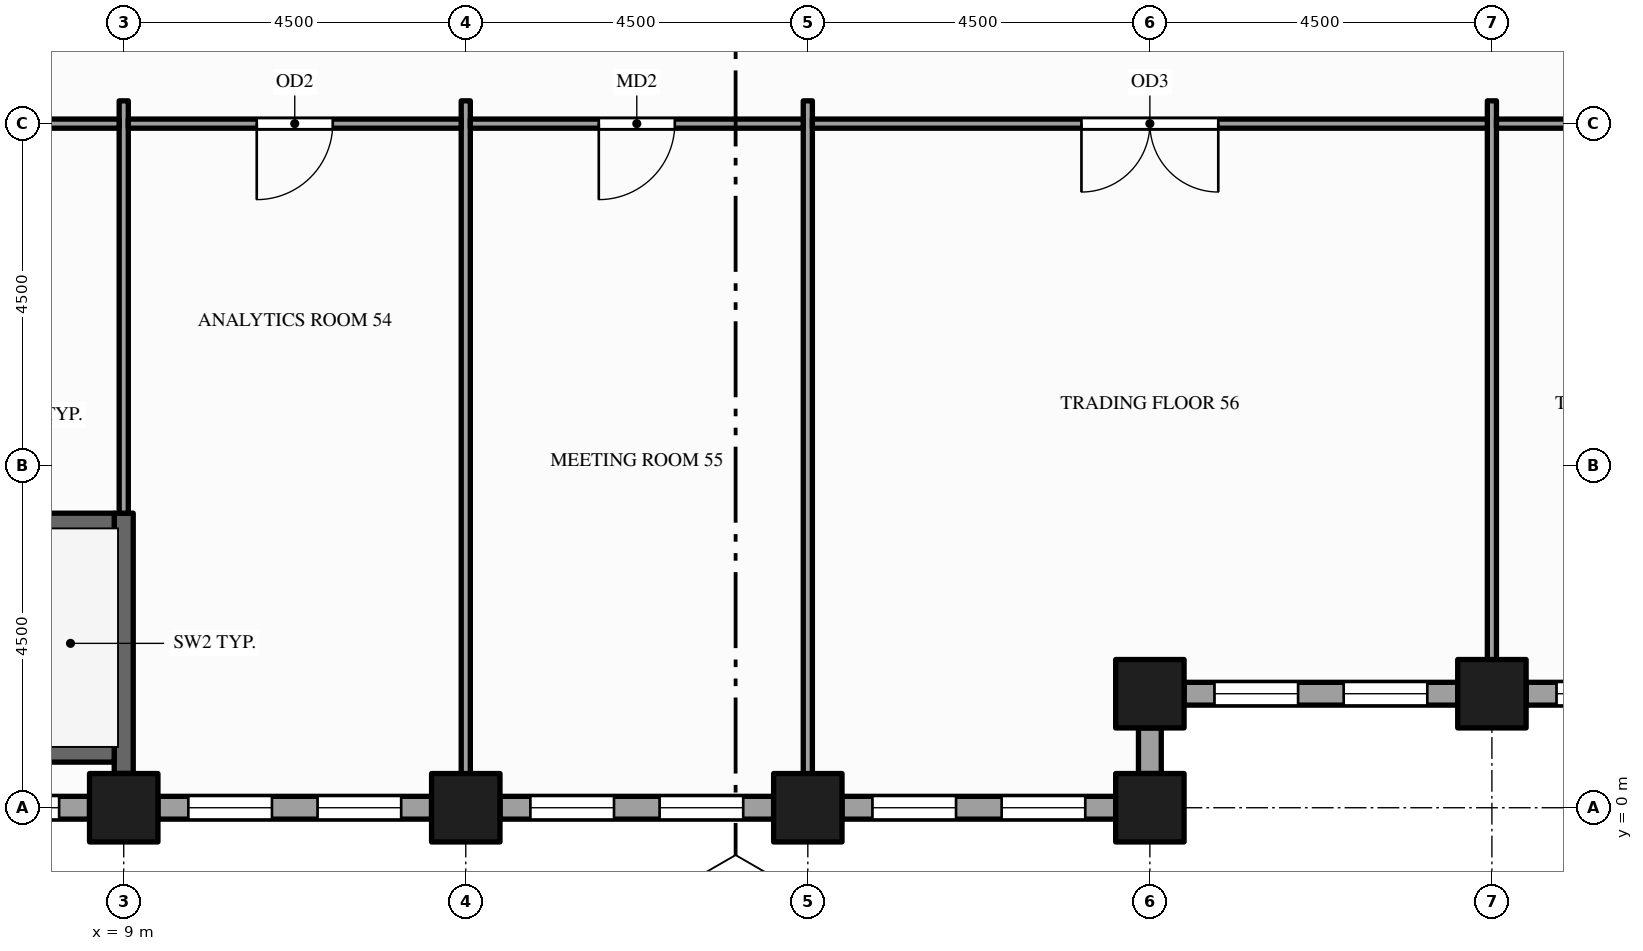
"""IFC4 building model, lengths in metres.
Left out: names, types, materials, properties, quantities, classifications, styles, units other than length and angle.
Written with IfcOpenShell. Run it as: python <this file> out.ifc"""

import sys

from ifc_helpers import new_model, si_unit, direction, frame, frame_2d, origin, origin_2d, place, context, subcontext, project, spatial, rectangle, hollow_rectangle, extrude, element, fill, save


model = new_model("IFC4")
c1 = context("Model", 3, precision=1e-05, world=origin(), true_north=direction((0.0, 1.0)))
c2 = subcontext(c1, "Body", "Model", "MODEL_VIEW")
j1 = project(units=[si_unit("LENGTHUNIT", "METRE"), si_unit("PLANEANGLEUNIT", "RADIAN")], contexts=[c1])
p1 = place(None, origin())
s1 = spatial("IfcSite", under=j1, at=p1, CompositionType="ELEMENT")
p2 = place(p1, origin())
s2 = spatial("IfcBuilding", under=s1, at=p2, CompositionType="ELEMENT")
p3 = place(p2, frame((0.0, 0.0, 139.0)))
s3 = spatial("IfcBuildingStorey", under=s2, at=p3, CompositionType="ELEMENT", Elevation=139.0)
for number, where, z_axis, x_axis in (
    (1, (9.0, 0.0, -0.15), (0.0, 0.0, 1.0), (1.0, 0.0, 0.0)),
    (2, (13.5, 0.0, -0.15), (0.0, 0.0, 1.0), (1.0, 0.0, 0.0)),
    (3, (18.0, 0.0, -0.15), (0.0, 0.0, 1.0), (1.0, 0.0, 0.0)),
    (4, (22.5, 0.0, -0.15), (0.0, 0.0, 1.0), (1.0, 0.0, 0.0)),
    (5, (22.5, 1.5, -0.15), (0.0, 0.0, 1.0), (1.0, 0.0, 0.0)),
    (6, (27.0, 1.5, -0.15), (0.0, 0.0, 1.0), (1.0, 0.0, 0.0)),
):
    element("IfcColumn", number, at=place(p3, frame(where, z_axis=z_axis, x_axis=x_axis)), inside=s3, PredefinedType="COLUMN", context=c2, shape_type="SweptSolid", body=[
        extrude(hollow_rectangle(XDim=0.9, YDim=0.9, WallThickness=0.045, at=origin_2d()), origin(), (0.0, 0.0, 1.0), 4.0),
    ])
p4 = place(p3, frame((4.95, 0.0, 0.0), z_axis=(0.0, 0.0, 1.0), x_axis=(1.0, 0.0, 0.0)))
e7 = element("IfcWall", 7, at=p4, inside=s3, PredefinedType="STANDARD", context=c2, shape_type="SweptSolid", body=[
    extrude(rectangle(XDim=3.6, YDim=0.3, at=frame_2d((1.8, 0.0))), origin(), (0.0, 0.0, 1.0), 3.149),
])
p5 = place(p4, frame((0.4, 0.0, 0.9)))
e8 = element("IfcOpeningElement", 8, at=p5, cuts=e7, PredefinedType="OPENING", context=c2, shape_type="SweptSolid", body=[
    extrude(rectangle(XDim=1.1, YDim=2.0, at=frame_2d((0.55, 1.0))), frame((0.0, 0.16, 0.0), z_axis=(0.0, -1.0, 0.0), x_axis=(1.0, 0.0, 0.0)), (0.0, 0.0, 1.0), 0.32),
])
p6 = place(p4, frame((2.1, 0.0, 0.9)))
e9 = element("IfcOpeningElement", 9, at=p6, cuts=e7, PredefinedType="OPENING", context=c2, shape_type="SweptSolid", body=[
    extrude(rectangle(XDim=1.1, YDim=2.0, at=frame_2d((0.55, 1.0))), frame((0.0, 0.16, 0.0), z_axis=(0.0, -1.0, 0.0), x_axis=(1.0, 0.0, 0.0)), (0.0, 0.0, 1.0), 0.32),
])
p7 = place(p3, frame((9.45, 0.0, 0.0), z_axis=(0.0, 0.0, 1.0), x_axis=(1.0, 0.0, 0.0)))
e10 = element("IfcWall", 10, at=p7, inside=s3, PredefinedType="STANDARD", context=c2, shape_type="SweptSolid", body=[
    extrude(rectangle(XDim=3.6, YDim=0.3, at=frame_2d((1.8, 0.0))), origin(), (0.0, 0.0, 1.0), 2.87),
])
p8 = place(p7, frame((0.4, 0.0, 0.9)))
e11 = element("IfcOpeningElement", 11, at=p8, cuts=e10, PredefinedType="OPENING", context=c2, shape_type="SweptSolid", body=[
    extrude(rectangle(XDim=1.1, YDim=1.75, at=frame_2d((0.55, 0.875))), frame((0.0, 0.16, 0.0), z_axis=(0.0, -1.0, 0.0), x_axis=(1.0, 0.0, 0.0)), (0.0, 0.0, 1.0), 0.32),
])
p9 = place(p7, frame((2.1, 0.0, 0.9)))
e12 = element("IfcOpeningElement", 12, at=p9, cuts=e10, PredefinedType="OPENING", context=c2, shape_type="SweptSolid", body=[
    extrude(rectangle(XDim=1.1, YDim=1.75, at=frame_2d((0.55, 0.875))), frame((0.0, 0.16, 0.0), z_axis=(0.0, -1.0, 0.0), x_axis=(1.0, 0.0, 0.0)), (0.0, 0.0, 1.0), 0.32),
])
p10 = place(p3, frame((13.95, 0.0, 0.0), z_axis=(0.0, 0.0, 1.0), x_axis=(1.0, 0.0, 0.0)))
e13 = element("IfcWall", 13, at=p10, inside=s3, PredefinedType="STANDARD", context=c2, shape_type="SweptSolid", body=[
    extrude(rectangle(XDim=3.6, YDim=0.3, at=frame_2d((1.8, 0.0))), origin(), (0.0, 0.0, 1.0), 2.87),
])
p11 = place(p10, frame((0.4, 0.0, 0.9)))
e14 = element("IfcOpeningElement", 14, at=p11, cuts=e13, PredefinedType="OPENING", context=c2, shape_type="SweptSolid", body=[
    extrude(rectangle(XDim=1.1, YDim=1.75, at=frame_2d((0.55, 0.875))), frame((0.0, 0.16, 0.0), z_axis=(0.0, -1.0, 0.0), x_axis=(1.0, 0.0, 0.0)), (0.0, 0.0, 1.0), 0.32),
])
p12 = place(p10, frame((2.1, 0.0, 0.9)))
e15 = element("IfcOpeningElement", 15, at=p12, cuts=e13, PredefinedType="OPENING", context=c2, shape_type="SweptSolid", body=[
    extrude(rectangle(XDim=1.1, YDim=1.75, at=frame_2d((0.55, 0.875))), frame((0.0, 0.16, 0.0), z_axis=(0.0, -1.0, 0.0), x_axis=(1.0, 0.0, 0.0)), (0.0, 0.0, 1.0), 0.32),
])
p13 = place(p3, frame((18.45, 0.0, 0.0), z_axis=(0.0, 0.0, 1.0), x_axis=(1.0, 0.0, 0.0)))
e16 = element("IfcWall", 16, at=p13, inside=s3, PredefinedType="STANDARD", context=c2, shape_type="SweptSolid", body=[
    extrude(rectangle(XDim=3.6, YDim=0.3, at=frame_2d((1.8, 0.0))), origin(), (0.0, 0.0, 1.0), 2.87),
])
p14 = place(p13, frame((0.4, 0.0, 0.9)))
e17 = element("IfcOpeningElement", 17, at=p14, cuts=e16, PredefinedType="OPENING", context=c2, shape_type="SweptSolid", body=[
    extrude(rectangle(XDim=1.1, YDim=1.75, at=frame_2d((0.55, 0.875))), frame((0.0, 0.16, 0.0), z_axis=(0.0, -1.0, 0.0), x_axis=(1.0, 0.0, 0.0)), (0.0, 0.0, 1.0), 0.32),
])
p15 = place(p13, frame((2.1, 0.0, 0.9)))
e18 = element("IfcOpeningElement", 18, at=p15, cuts=e16, PredefinedType="OPENING", context=c2, shape_type="SweptSolid", body=[
    extrude(rectangle(XDim=1.1, YDim=1.75, at=frame_2d((0.55, 0.875))), frame((0.0, 0.16, 0.0), z_axis=(0.0, -1.0, 0.0), x_axis=(1.0, 0.0, 0.0)), (0.0, 0.0, 1.0), 0.32),
])
p16 = place(p3, frame((22.5, 0.45, 0.0), z_axis=(0.0, 0.0, 1.0), x_axis=(0.0, 1.0, 0.0)))
e19 = element("IfcWall", 19, at=p16, inside=s3, PredefinedType="STANDARD", context=c2, shape_type="SweptSolid", body=[
    extrude(rectangle(XDim=0.6, YDim=0.3, at=frame_2d((0.3, 0.0))), origin(), (0.0, 0.0, 1.0), 3.149),
])
p17 = place(p3, frame((22.95, 1.5, 0.0), z_axis=(0.0, 0.0, 1.0), x_axis=(1.0, 0.0, 0.0)))
e20 = element("IfcWall", 20, at=p17, inside=s3, PredefinedType="STANDARD", context=c2, shape_type="SweptSolid", body=[
    extrude(rectangle(XDim=3.6, YDim=0.3, at=frame_2d((1.8, 0.0))), origin(), (0.0, 0.0, 1.0), 2.87),
])
p18 = place(p17, frame((0.4, 0.0, 0.9)))
e21 = element("IfcOpeningElement", 21, at=p18, cuts=e20, PredefinedType="OPENING", context=c2, shape_type="SweptSolid", body=[
    extrude(rectangle(XDim=1.1, YDim=1.75, at=frame_2d((0.55, 0.875))), frame((0.0, 0.16, 0.0), z_axis=(0.0, -1.0, 0.0), x_axis=(1.0, 0.0, 0.0)), (0.0, 0.0, 1.0), 0.32),
])
p19 = place(p17, frame((2.1, 0.0, 0.9)))
e22 = element("IfcOpeningElement", 22, at=p19, cuts=e20, PredefinedType="OPENING", context=c2, shape_type="SweptSolid", body=[
    extrude(rectangle(XDim=1.1, YDim=1.75, at=frame_2d((0.55, 0.875))), frame((0.0, 0.16, 0.0), z_axis=(0.0, -1.0, 0.0), x_axis=(1.0, 0.0, 0.0)), (0.0, 0.0, 1.0), 0.32),
])
p20 = place(p3, frame((27.45, 1.5, 0.0), z_axis=(0.0, 0.0, 1.0), x_axis=(1.0, 0.0, 0.0)))
e23 = element("IfcWall", 23, at=p20, inside=s3, PredefinedType="STANDARD", context=c2, shape_type="SweptSolid", body=[
    extrude(rectangle(XDim=3.6, YDim=0.3, at=frame_2d((1.8, 0.0))), origin(), (0.0, 0.0, 1.0), 2.87),
])
p21 = place(p20, frame((0.4, 0.0, 0.9)))
e24 = element("IfcOpeningElement", 24, at=p21, cuts=e23, PredefinedType="OPENING", context=c2, shape_type="SweptSolid", body=[
    extrude(rectangle(XDim=1.1, YDim=1.75, at=frame_2d((0.55, 0.875))), frame((0.0, 0.16, 0.0), z_axis=(0.0, -1.0, 0.0), x_axis=(1.0, 0.0, 0.0)), (0.0, 0.0, 1.0), 0.32),
])
p22 = place(p20, frame((2.1, 0.0, 0.9)))
e25 = element("IfcOpeningElement", 25, at=p22, cuts=e23, PredefinedType="OPENING", context=c2, shape_type="SweptSolid", body=[
    extrude(rectangle(XDim=1.1, YDim=1.75, at=frame_2d((0.55, 0.875))), frame((0.0, 0.16, 0.0), z_axis=(0.0, -1.0, 0.0), x_axis=(1.0, 0.0, 0.0)), (0.0, 0.0, 1.0), 0.32),
])
p23 = place(p3, frame((9.0, 0.15, 0.0), z_axis=(0.0, 0.0, 1.0), x_axis=(0.0, 1.0, 0.0)))
e26 = element("IfcWall", 26, at=p23, inside=s3, PredefinedType="PARTITIONING", context=c2, shape_type="SweptSolid", body=[
    extrude(rectangle(XDim=0.3, YDim=0.12, at=frame_2d((0.15, 0.0))), origin(), (0.0, 0.0, 1.0), 3.85),
])
p24 = place(p3, frame((9.0, 0.45, 0.0), z_axis=(0.0, 0.0, 1.0), x_axis=(0.0, 1.0, 0.0)))
e27 = element("IfcWall", 27, at=p24, inside=s3, PredefinedType="SHEAR", context=c2, shape_type="SweptSolid", body=[
    extrude(rectangle(XDim=3.425, YDim=0.25, at=frame_2d((1.712, 0.0))), origin(), (0.0, 0.0, 1.0), 3.85),
])
p25 = place(p3, frame((9.0, 3.875, 0.0), z_axis=(0.0, 0.0, 1.0), x_axis=(0.0, 1.0, 0.0)))
e28 = element("IfcWall", 28, at=p25, inside=s3, PredefinedType="PARTITIONING", context=c2, shape_type="SweptSolid", body=[
    extrude(rectangle(XDim=5.425, YDim=0.12, at=frame_2d((2.712, 0.0))), origin(), (0.0, 0.0, 1.0), 2.87),
])
for number, where, z_axis, x_axis in (
    (29, (13.5, 0.15, 0.0), (0.0, 0.0, 1.0), (0.0, 1.0, 0.0)),
    (30, (18.0, 0.15, 0.0), (0.0, 0.0, 1.0), (0.0, 1.0, 0.0)),
):
    element("IfcWall", number, at=place(p3, frame(where, z_axis=z_axis, x_axis=x_axis)), inside=s3, PredefinedType="PARTITIONING", context=c2, shape_type="SweptSolid", body=[
        extrude(rectangle(XDim=9.15, YDim=0.12, at=frame_2d((4.575, 0.0))), origin(), (0.0, 0.0, 1.0), 2.87),
    ])
p26 = place(p3, frame((27.0, 1.65, 0.0), z_axis=(0.0, 0.0, 1.0), x_axis=(0.0, 1.0, 0.0)))
e31 = element("IfcWall", 31, at=p26, inside=s3, PredefinedType="PARTITIONING", context=c2, shape_type="SweptSolid", body=[
    extrude(rectangle(XDim=7.65, YDim=0.12, at=frame_2d((3.825, 0.0))), origin(), (0.0, 0.0, 1.0), 2.87),
])
p27 = place(p3, frame((0.85, 0.725, 0.0), z_axis=(0.0, 0.0, 1.0), x_axis=(1.0, 0.0, 0.0)))
e32 = element("IfcWall", 32, at=p27, inside=s3, PredefinedType="SHEAR", context=c2, shape_type="SweptSolid", body=[
    extrude(rectangle(XDim=8.025, YDim=0.25, at=frame_2d((4.012, 0.0))), origin(), (0.0, 0.0, 1.0), 3.85),
])
p28 = place(p3, frame((0.85, 3.75, 0.0), z_axis=(0.0, 0.0, 1.0), x_axis=(1.0, 0.0, 0.0)))
e33 = element("IfcWall", 33, at=p28, inside=s3, PredefinedType="SHEAR", context=c2, shape_type="SweptSolid", body=[
    extrude(rectangle(XDim=8.025, YDim=0.25, at=frame_2d((4.012, 0.0))), origin(), (0.0, 0.0, 1.0), 3.85),
])
p29 = place(p28, frame((0.15, 0.0, 0.0)))
e34 = element("IfcOpeningElement", 34, at=p29, cuts=e33, PredefinedType="OPENING", context=c2, shape_type="SweptSolid", body=[
    extrude(rectangle(XDim=1.1, YDim=2.1, at=frame_2d((0.55, 1.05))), frame((0.0, 0.135, 0.0), z_axis=(0.0, -1.0, 0.0), x_axis=(1.0, 0.0, 0.0)), (0.0, 0.0, 1.0), 0.27),
])
p30 = place(p3, frame((0.15, 9.0, 0.0), z_axis=(0.0, 0.0, 1.0), x_axis=(1.0, 0.0, 0.0)))
e35 = element("IfcWall", 35, at=p30, inside=s3, PredefinedType="PARTITIONING", context=c2, shape_type="SweptSolid", body=[
    extrude(rectangle(XDim=8.79, YDim=0.12, at=frame_2d((4.395, 0.0))), origin(), (0.0, 0.0, 1.0), 2.87),
])
p31 = place(p30, frame((3.805, 0.0, 0.0)))
e36 = element("IfcOpeningElement", 36, at=p31, cuts=e35, PredefinedType="OPENING", context=c2, shape_type="SweptSolid", body=[
    extrude(rectangle(XDim=1.2, YDim=2.1, at=frame_2d((0.6, 1.05))), frame((0.0, 0.07, 0.0), z_axis=(0.0, -1.0, 0.0), x_axis=(1.0, 0.0, 0.0)), (0.0, 0.0, 1.0), 0.14),
])
p32 = place(p3, frame((9.06, 9.0, 0.0), z_axis=(0.0, 0.0, 1.0), x_axis=(1.0, 0.0, 0.0)))
e37 = element("IfcWall", 37, at=p32, inside=s3, PredefinedType="PARTITIONING", context=c2, shape_type="SweptSolid", body=[
    extrude(rectangle(XDim=4.38, YDim=0.12, at=frame_2d((2.19, 0.0))), origin(), (0.0, 0.0, 1.0), 2.87),
])
p33 = place(p32, frame((1.69, 0.0, 0.0)))
e38 = element("IfcOpeningElement", 38, at=p33, cuts=e37, PredefinedType="OPENING", context=c2, shape_type="SweptSolid", body=[
    extrude(rectangle(XDim=1.0, YDim=2.1, at=frame_2d((0.5, 1.05))), frame((0.0, 0.07, 0.0), z_axis=(0.0, -1.0, 0.0), x_axis=(1.0, 0.0, 0.0)), (0.0, 0.0, 1.0), 0.14),
])
p34 = place(p3, frame((13.56, 9.0, 0.0), z_axis=(0.0, 0.0, 1.0), x_axis=(1.0, 0.0, 0.0)))
e39 = element("IfcWall", 39, at=p34, inside=s3, PredefinedType="PARTITIONING", context=c2, shape_type="SweptSolid", body=[
    extrude(rectangle(XDim=4.38, YDim=0.12, at=frame_2d((2.19, 0.0))), origin(), (0.0, 0.0, 1.0), 2.87),
])
p35 = place(p34, frame((1.69, 0.0, 0.0)))
e40 = element("IfcOpeningElement", 40, at=p35, cuts=e39, PredefinedType="OPENING", context=c2, shape_type="SweptSolid", body=[
    extrude(rectangle(XDim=1.0, YDim=2.1, at=frame_2d((0.5, 1.05))), frame((0.0, 0.07, 0.0), z_axis=(0.0, -1.0, 0.0), x_axis=(1.0, 0.0, 0.0)), (0.0, 0.0, 1.0), 0.14),
])
p36 = place(p3, frame((18.06, 9.0, 0.0), z_axis=(0.0, 0.0, 1.0), x_axis=(1.0, 0.0, 0.0)))
e41 = element("IfcWall", 41, at=p36, inside=s3, PredefinedType="PARTITIONING", context=c2, shape_type="SweptSolid", body=[
    extrude(rectangle(XDim=8.88, YDim=0.12, at=frame_2d((4.44, 0.0))), origin(), (0.0, 0.0, 1.0), 2.87),
])
p37 = place(p36, frame((3.54, 0.0, 0.0)))
e42 = element("IfcOpeningElement", 42, at=p37, cuts=e41, PredefinedType="OPENING", context=c2, shape_type="SweptSolid", body=[
    extrude(rectangle(XDim=1.8, YDim=2.1, at=frame_2d((0.9, 1.05))), frame((0.0, 0.07, 0.0), z_axis=(0.0, -1.0, 0.0), x_axis=(1.0, 0.0, 0.0)), (0.0, 0.0, 1.0), 0.14),
])
p38 = place(p3, frame((27.06, 9.0, 0.0), z_axis=(0.0, 0.0, 1.0), x_axis=(1.0, 0.0, 0.0)))
e43 = element("IfcWall", 43, at=p38, inside=s3, PredefinedType="PARTITIONING", context=c2, shape_type="SweptSolid", body=[
    extrude(rectangle(XDim=4.29, YDim=0.12, at=frame_2d((2.145, 0.0))), origin(), (0.0, 0.0, 1.0), 2.87),
])
p39 = place(p38, frame((1.635, 0.0, 0.0)))
e44 = element("IfcOpeningElement", 44, at=p39, cuts=e43, PredefinedType="OPENING", context=c2, shape_type="SweptSolid", body=[
    extrude(rectangle(XDim=1.0, YDim=2.1, at=frame_2d((0.5, 1.05))), frame((0.0, 0.07, 0.0), z_axis=(0.0, -1.0, 0.0), x_axis=(1.0, 0.0, 0.0)), (0.0, 0.0, 1.0), 0.14),
])
p40 = place(p6, origin())
e45 = element("IfcWindow", 45, at=p40, inside=s3, PartitioningType="SINGLE_PANEL", PredefinedType="WINDOW", context=c2, shape_type="SweptSolid", body=[
    extrude(rectangle(XDim=1.1, YDim=2.0, at=frame_2d((0.55, 1.0))), frame((0.0, 0.03, 0.0), z_axis=(0.0, -1.0, 0.0), x_axis=(1.0, 0.0, 0.0)), (0.0, 0.0, 1.0), 0.06),
])
fill(e9, e45)
p41 = place(p8, origin())
e46 = element("IfcWindow", 46, at=p41, inside=s3, PartitioningType="SINGLE_PANEL", PredefinedType="WINDOW", context=c2, shape_type="SweptSolid", body=[
    extrude(rectangle(XDim=1.1, YDim=1.75, at=frame_2d((0.55, 0.875))), frame((0.0, 0.03, 0.0), z_axis=(0.0, -1.0, 0.0), x_axis=(1.0, 0.0, 0.0)), (0.0, 0.0, 1.0), 0.06),
])
fill(e11, e46)
p42 = place(p9, origin())
e47 = element("IfcWindow", 47, at=p42, inside=s3, PartitioningType="SINGLE_PANEL", PredefinedType="WINDOW", context=c2, shape_type="SweptSolid", body=[
    extrude(rectangle(XDim=1.1, YDim=1.75, at=frame_2d((0.55, 0.875))), frame((0.0, 0.03, 0.0), z_axis=(0.0, -1.0, 0.0), x_axis=(1.0, 0.0, 0.0)), (0.0, 0.0, 1.0), 0.06),
])
fill(e12, e47)
p43 = place(p11, origin())
e48 = element("IfcWindow", 48, at=p43, inside=s3, PartitioningType="SINGLE_PANEL", PredefinedType="WINDOW", context=c2, shape_type="SweptSolid", body=[
    extrude(rectangle(XDim=1.1, YDim=1.75, at=frame_2d((0.55, 0.875))), frame((0.0, 0.03, 0.0), z_axis=(0.0, -1.0, 0.0), x_axis=(1.0, 0.0, 0.0)), (0.0, 0.0, 1.0), 0.06),
])
fill(e14, e48)
p44 = place(p12, origin())
e49 = element("IfcWindow", 49, at=p44, inside=s3, PartitioningType="SINGLE_PANEL", PredefinedType="WINDOW", context=c2, shape_type="SweptSolid", body=[
    extrude(rectangle(XDim=1.1, YDim=1.75, at=frame_2d((0.55, 0.875))), frame((0.0, 0.03, 0.0), z_axis=(0.0, -1.0, 0.0), x_axis=(1.0, 0.0, 0.0)), (0.0, 0.0, 1.0), 0.06),
])
fill(e15, e49)
p45 = place(p14, origin())
e50 = element("IfcWindow", 50, at=p45, inside=s3, PartitioningType="SINGLE_PANEL", PredefinedType="WINDOW", context=c2, shape_type="SweptSolid", body=[
    extrude(rectangle(XDim=1.1, YDim=1.75, at=frame_2d((0.55, 0.875))), frame((0.0, 0.03, 0.0), z_axis=(0.0, -1.0, 0.0), x_axis=(1.0, 0.0, 0.0)), (0.0, 0.0, 1.0), 0.06),
])
fill(e17, e50)
p46 = place(p15, origin())
e51 = element("IfcWindow", 51, at=p46, inside=s3, PartitioningType="SINGLE_PANEL", PredefinedType="WINDOW", context=c2, shape_type="SweptSolid", body=[
    extrude(rectangle(XDim=1.1, YDim=1.75, at=frame_2d((0.55, 0.875))), frame((0.0, 0.03, 0.0), z_axis=(0.0, -1.0, 0.0), x_axis=(1.0, 0.0, 0.0)), (0.0, 0.0, 1.0), 0.06),
])
fill(e18, e51)
p47 = place(p18, origin())
e52 = element("IfcWindow", 52, at=p47, inside=s3, PartitioningType="SINGLE_PANEL", PredefinedType="WINDOW", context=c2, shape_type="SweptSolid", body=[
    extrude(rectangle(XDim=1.1, YDim=1.75, at=frame_2d((0.55, 0.875))), frame((0.0, 0.03, 0.0), z_axis=(0.0, -1.0, 0.0), x_axis=(1.0, 0.0, 0.0)), (0.0, 0.0, 1.0), 0.06),
])
fill(e21, e52)
p48 = place(p19, origin())
e53 = element("IfcWindow", 53, at=p48, inside=s3, PartitioningType="SINGLE_PANEL", PredefinedType="WINDOW", context=c2, shape_type="SweptSolid", body=[
    extrude(rectangle(XDim=1.1, YDim=1.75, at=frame_2d((0.55, 0.875))), frame((0.0, 0.03, 0.0), z_axis=(0.0, -1.0, 0.0), x_axis=(1.0, 0.0, 0.0)), (0.0, 0.0, 1.0), 0.06),
])
fill(e22, e53)
p49 = place(p21, origin())
e54 = element("IfcWindow", 54, at=p49, inside=s3, PartitioningType="SINGLE_PANEL", PredefinedType="WINDOW", context=c2, shape_type="SweptSolid", body=[
    extrude(rectangle(XDim=1.1, YDim=1.75, at=frame_2d((0.55, 0.875))), frame((0.0, 0.03, 0.0), z_axis=(0.0, -1.0, 0.0), x_axis=(1.0, 0.0, 0.0)), (0.0, 0.0, 1.0), 0.06),
])
fill(e24, e54)
p50 = place(p33, origin())
e55 = element("IfcDoor", 55, at=p50, inside=s3, OperationType="SINGLE_SWING_LEFT", PredefinedType="DOOR", context=c2, shape_type="SweptSolid", body=[
    extrude(rectangle(XDim=1.0, YDim=2.1, at=frame_2d((0.5, 1.05))), frame((0.0, 0.025, 0.0), z_axis=(0.0, -1.0, 0.0), x_axis=(1.0, 0.0, 0.0)), (0.0, 0.0, 1.0), 0.05),
])
fill(e38, e55)
p51 = place(p35, origin())
e56 = element("IfcDoor", 56, at=p51, inside=s3, OperationType="SINGLE_SWING_LEFT", PredefinedType="DOOR", context=c2, shape_type="SweptSolid", body=[
    extrude(rectangle(XDim=1.0, YDim=2.1, at=frame_2d((0.5, 1.05))), frame((0.0, 0.025, 0.0), z_axis=(0.0, -1.0, 0.0), x_axis=(1.0, 0.0, 0.0)), (0.0, 0.0, 1.0), 0.05),
])
fill(e40, e56)
p52 = place(p37, origin())
e57 = element("IfcDoor", 57, at=p52, inside=s3, OperationType="DOUBLE_DOOR_SINGLE_SWING", PredefinedType="DOOR", context=c2, shape_type="SweptSolid", body=[
    extrude(rectangle(XDim=1.8, YDim=2.1, at=frame_2d((0.9, 1.05))), frame((0.0, 0.025, 0.0), z_axis=(0.0, -1.0, 0.0), x_axis=(1.0, 0.0, 0.0)), (0.0, 0.0, 1.0), 0.05),
])
fill(e42, e57)
save(model, sys.argv[1])
